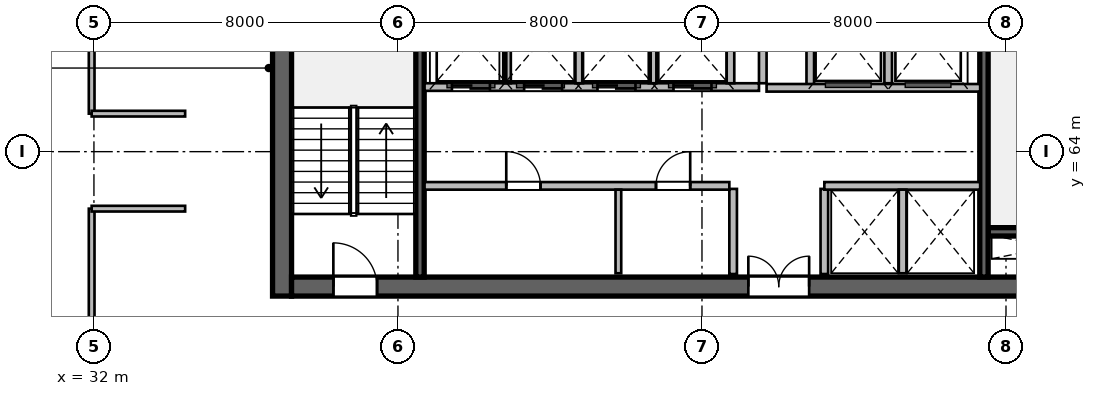
"""IFC4 building model, lengths in metres.
Left out: names, types, materials, properties, quantities, classifications, styles, units other than length and angle.
Written with IfcOpenShell. Run it as: python <this file> out.ifc"""

import sys

from ifc_helpers import new_model, si_unit, direction, frame, frame_2d, origin, place, context, subcontext, project, spatial, rectangle, extrude, source, transform, mapped, element, fill, save


model = new_model("IFC4")
c1 = context("Model", 3, precision=1e-05, world=origin(), true_north=direction((0.0, 1.0)))
c2 = subcontext(c1, "Body", "Model", "MODEL_VIEW")
j1 = project(units=[si_unit("LENGTHUNIT", "METRE"), si_unit("PLANEANGLEUNIT", "RADIAN")], contexts=[c1])
p1 = place(None, origin())
s1 = spatial("IfcSite", under=j1, at=p1, CompositionType="ELEMENT")
p2 = place(p1, origin())
s2 = spatial("IfcBuilding", under=s1, at=p2, CompositionType="ELEMENT")
p3 = place(p2, frame((0.0, 0.0, 142.8)))
s3 = spatial("IfcBuildingStorey", under=s2, at=p3, CompositionType="ELEMENT", Elevation=142.8)
m1 = source(origin(), c2, "Body", "SweptSolid", [
    extrude(rectangle(XDim=12.0, YDim=0.5, at=frame_2d((6.0, 0.0))), origin(), (0.0, 0.0, 1.0), 3.9),
])
p4 = place(p3, frame((36.95, 60.2, 0.0), z_axis=(0.0, 0.0, 1.0), x_axis=(0.0, 1.0, 0.0)))
e1 = element("IfcWall", 1, at=p4, inside=s3, PredefinedType="SHEAR", context=c2, shape_type="MappedRepresentation", body=[
    mapped(m1, transform((0.0, 0.0, 0.0), scale=1.0)),
])
m2 = source(origin(), c2, "Body", "SweptSolid", [
    extrude(rectangle(XDim=21.6, YDim=0.5, at=frame_2d((10.8, 0.0))), origin(), (0.0, 0.0, 1.0), 3.9),
])
p5 = place(p3, frame((37.2, 60.45, 0.0), z_axis=(0.0, 0.0, 1.0), x_axis=(1.0, 0.0, 0.0)))
e2 = element("IfcWall", 2, at=p5, inside=s3, PredefinedType="SHEAR", context=c2, shape_type="MappedRepresentation", body=[
    mapped(m2, transform((0.0, 0.0, 0.0), scale=1.0)),
])
p6 = place(p5, frame((1.1, 0.0, 0.0)))
e3 = element("IfcOpeningElement", 3, at=p6, cuts=e2, PredefinedType="OPENING", context=c2, shape_type="SweptSolid", body=[
    extrude(rectangle(XDim=1.15, YDim=2.15, at=frame_2d((0.575, 1.075))), frame((0.0, 0.26, 0.0), z_axis=(0.0, -1.0, 0.0), x_axis=(1.0, 0.0, 0.0)), (0.0, 0.0, 1.0), 0.52),
])
p7 = place(p5, frame((19.5, 0.0, 0.0)))
e4 = element("IfcOpeningElement", 4, at=p7, cuts=e2, PredefinedType="OPENING", context=c2, shape_type="SweptSolid", body=[
    extrude(rectangle(XDim=0.9, YDim=2.1, at=frame_2d((0.45, 1.05))), frame((0.0, 0.26, 0.0), z_axis=(0.0, -1.0, 0.0), x_axis=(1.0, 0.0, 0.0)), (0.0, 0.0, 1.0), 0.52),
])
p8 = place(p5, frame((12.02, 0.0, 0.0)))
e5 = element("IfcOpeningElement", 5, at=p8, cuts=e2, PredefinedType="OPENING", context=c2, shape_type="SweptSolid", body=[
    extrude(rectangle(XDim=1.6, YDim=2.15, at=frame_2d((0.8, 1.075))), frame((0.0, 0.26, 0.0), z_axis=(0.0, -1.0, 0.0), x_axis=(1.0, 0.0, 0.0)), (0.0, 0.0, 1.0), 0.52),
])
m3 = source(origin(), c2, "Body", "SweptSolid", [
    extrude(rectangle(XDim=3.27, YDim=0.22, at=frame_2d((1.635, 0.0))), origin(), (0.0, 0.0, 1.0), 3.9),
])
p9 = place(p3, frame((55.53, 61.89, 0.0), z_axis=(0.0, 0.0, 1.0), x_axis=(1.0, 0.0, 0.0)))
e6 = element("IfcWall", 6, at=p9, inside=s3, PredefinedType="SHEAR", context=c2, shape_type="MappedRepresentation", body=[
    mapped(m3, transform((0.0, 0.0, 0.0), scale=1.0)),
])
m4 = source(origin(), c2, "Body", "SweptSolid", [
    extrude(rectangle(XDim=11.0, YDim=0.22, at=frame_2d((5.5, 0.0))), origin(), (0.0, 0.0, 1.0), 3.9),
])
p10 = place(p3, frame((40.58, 60.7, 0.0), z_axis=(0.0, 0.0, 1.0), x_axis=(0.0, 1.0, 0.0)))
e7 = element("IfcWall", 7, at=p10, inside=s3, PredefinedType="SHEAR", context=c2, shape_type="MappedRepresentation", body=[
    mapped(m4, transform((0.0, 0.0, 0.0), scale=1.0)),
])
p11 = place(p3, frame((55.42, 60.7, 0.0), z_axis=(0.0, 0.0, 1.0), x_axis=(0.0, 1.0, 0.0)))
e8 = element("IfcWall", 8, at=p11, inside=s3, PredefinedType="SHEAR", context=c2, shape_type="MappedRepresentation", body=[
    mapped(m4, transform((0.0, 0.0, 0.0), scale=1.0)),
])
p12 = place(p11, frame((9.545, 0.0, 0.0)))
e9 = element("IfcOpeningElement", 9, at=p12, cuts=e8, PredefinedType="OPENING", context=c2, shape_type="SweptSolid", body=[
    extrude(rectangle(XDim=1.15, YDim=2.15, at=frame_2d((0.575, 1.075))), frame((0.0, 0.12, 0.0), z_axis=(0.0, -1.0, 0.0), x_axis=(1.0, 0.0, 0.0)), (0.0, 0.0, 1.0), 0.24),
])
m5 = source(origin(), c2, "Body", "SweptSolid", [
    extrude(rectangle(XDim=2.24, YDim=0.2, at=frame_2d((1.12, 0.0))), origin(), (0.0, 0.0, 1.0), 3.65),
])
for number, where, z_axis, x_axis in (
    (10, (48.82, 60.78, 0.0), (0.0, 0.0, 1.0), (0.0, 1.0, 0.0)),
    (11, (51.22, 60.78, 0.0), (0.0, 0.0, 1.0), (0.0, 1.0, 0.0)),
):
    element("IfcWall", number, at=place(p3, frame(where, z_axis=z_axis, x_axis=x_axis)), inside=s3, PredefinedType="SOLIDWALL", context=c2, shape_type="MappedRepresentation", body=[
        mapped(m5, transform((0.0, 0.0, 0.0), scale=1.0)),
    ])
m6 = source(origin(), c2, "Body", "SweptSolid", [
    extrude(rectangle(XDim=5.8, YDim=0.2, at=frame_2d((2.9, 0.0))), origin(), (0.0, 0.0, 1.0), 3.65),
])
p13 = place(p3, frame((49.6, 65.8, 0.0), z_axis=(0.0, 0.0, 1.0), x_axis=(0.0, 1.0, 0.0)))
e12 = element("IfcWall", 12, at=p13, inside=s3, PredefinedType="SOLIDWALL", context=c2, shape_type="MappedRepresentation", body=[
    mapped(m6, transform((0.0, 0.0, 0.0), scale=1.0)),
])
m7 = source(origin(), c2, "Body", "SweptSolid", [
    extrude(rectangle(XDim=2.58, YDim=0.2, at=frame_2d((1.29, 0.0))), origin(), (0.0, 0.0, 1.0), 3.65),
])
p14 = place(p3, frame((50.85, 65.68, 0.0), z_axis=(0.0, 0.0, 1.0), x_axis=(0.0, 1.0, 0.0)))
e13 = element("IfcWall", 13, at=p14, inside=s3, PredefinedType="SOLIDWALL", context=c2, shape_type="MappedRepresentation", body=[
    mapped(m7, transform((0.0, 0.0, 0.0), scale=1.0)),
])
m8 = source(origin(), c2, "Body", "SweptSolid", [
    extrude(rectangle(XDim=2.4, YDim=0.2, at=frame_2d((1.2, 0.0))), origin(), (0.0, 0.0, 1.0), 3.65),
])
p15 = place(p3, frame((52.9, 65.8, 0.0), z_axis=(0.0, 0.0, 1.0), x_axis=(0.0, 1.0, 0.0)))
e14 = element("IfcWall", 14, at=p15, inside=s3, PredefinedType="SOLIDWALL", context=c2, shape_type="MappedRepresentation", body=[
    mapped(m8, transform((0.0, 0.0, 0.0), scale=1.0)),
])
m9 = source(origin(), c2, "Body", "SweptSolid", [
    extrude(rectangle(XDim=5.62, YDim=0.2, at=frame_2d((2.81, 0.0))), origin(), (0.0, 0.0, 1.0), 3.65),
])
p16 = place(p3, frame((49.7, 65.68, 0.0), z_axis=(0.0, 0.0, 1.0), x_axis=(1.0, 0.0, 0.0)))
e15 = element("IfcWall", 15, at=p16, inside=s3, PredefinedType="SOLIDWALL", context=c2, shape_type="MappedRepresentation", body=[
    mapped(m9, transform((0.0, 0.0, 0.0), scale=1.0)),
])
m10 = source(origin(), c2, "Body", "SweptSolid", [
    extrude(rectangle(XDim=8.02, YDim=0.2, at=frame_2d((4.01, 0.0))), origin(), (0.0, 0.0, 1.0), 3.65),
])
p17 = place(p3, frame((40.7, 63.1, 0.0), z_axis=(0.0, 0.0, 1.0), x_axis=(1.0, 0.0, 0.0)))
e16 = element("IfcWall", 16, at=p17, inside=s3, PredefinedType="SOLIDWALL", context=c2, shape_type="MappedRepresentation", body=[
    mapped(m10, transform((0.0, 0.0, 0.0), scale=1.0)),
])
p18 = place(p17, frame((2.15, 0.0, 0.0)))
e17 = element("IfcOpeningElement", 17, at=p18, cuts=e16, PredefinedType="OPENING", context=c2, shape_type="SweptSolid", body=[
    extrude(rectangle(XDim=0.9, YDim=2.1, at=frame_2d((0.45, 1.05))), frame((0.0, 0.11, 0.0), z_axis=(0.0, -1.0, 0.0), x_axis=(1.0, 0.0, 0.0)), (0.0, 0.0, 1.0), 0.22),
])
p19 = place(p17, frame((6.09, 0.0, 0.0)))
e18 = element("IfcOpeningElement", 18, at=p19, cuts=e16, PredefinedType="OPENING", context=c2, shape_type="SweptSolid", body=[
    extrude(rectangle(XDim=0.9, YDim=2.1, at=frame_2d((0.45, 1.05))), frame((0.0, 0.11, 0.0), z_axis=(0.0, -1.0, 0.0), x_axis=(1.0, 0.0, 0.0)), (0.0, 0.0, 1.0), 0.22),
])
m11 = source(origin(), c2, "Body", "SweptSolid", [
    extrude(rectangle(XDim=4.1, YDim=0.2, at=frame_2d((2.05, 0.0))), origin(), (0.0, 0.0, 1.0), 3.65),
])
p20 = place(p3, frame((51.22, 63.1, 0.0), z_axis=(0.0, 0.0, 1.0), x_axis=(1.0, 0.0, 0.0)))
e19 = element("IfcWall", 19, at=p20, inside=s3, PredefinedType="SOLIDWALL", context=c2, shape_type="MappedRepresentation", body=[
    mapped(m11, transform((0.0, 0.0, 0.0), scale=1.0)),
])
m12 = source(origin(), c2, "Body", "SweptSolid", [
    extrude(rectangle(XDim=2.2, YDim=0.15, at=frame_2d((1.1, 0.0))), origin(), (0.0, 0.0, 1.0), 3.65),
])
p21 = place(p3, frame((45.8, 60.8, 0.0), z_axis=(0.0, 0.0, 1.0), x_axis=(0.0, 1.0, 0.0)))
e20 = element("IfcWall", 20, at=p21, inside=s3, PredefinedType="PARTITIONING", context=c2, shape_type="MappedRepresentation", body=[
    mapped(m12, transform((0.0, 0.0, 0.0), scale=1.0)),
])
m13 = source(origin(), c2, "Body", "SweptSolid", [
    extrude(rectangle(XDim=2.2, YDim=0.2, at=frame_2d((1.1, 0.0))), origin(), (0.0, 0.0, 1.0), 3.65),
])
p22 = place(p3, frame((53.28, 60.8, 0.0), z_axis=(0.0, 0.0, 1.0), x_axis=(0.0, 1.0, 0.0)))
e21 = element("IfcWall", 21, at=p22, inside=s3, PredefinedType="SOLIDWALL", context=c2, shape_type="MappedRepresentation", body=[
    mapped(m13, transform((0.0, 0.0, 0.0), scale=1.0)),
])
m14 = source(origin(), c2, "Body", "SweptSolid", [
    extrude(rectangle(XDim=8.8, YDim=0.2, at=frame_2d((4.4, 0.0))), origin(), (0.0, 0.0, 1.0), 3.65),
])
p23 = place(p3, frame((40.7, 65.7, 0.0), z_axis=(0.0, 0.0, 1.0), x_axis=(1.0, 0.0, 0.0)))
e22 = element("IfcWall", 22, at=p23, inside=s3, PredefinedType="SOLIDWALL", context=c2, shape_type="MappedRepresentation", body=[
    mapped(m14, transform((0.0, 0.0, 0.0), scale=1.0)),
])
p24 = place(p23, frame((0.72, 0.0, 0.0)))
e23 = element("IfcOpeningElement", 23, at=p24, cuts=e22, PredefinedType="OPENING", context=c2, shape_type="SweptSolid", body=[
    extrude(rectangle(XDim=1.0, YDim=2.15, at=frame_2d((0.5, 1.075))), frame((0.0, 0.11, 0.0), z_axis=(0.0, -1.0, 0.0), x_axis=(1.0, 0.0, 0.0)), (0.0, 0.0, 1.0), 0.22),
])
p25 = place(p23, frame((2.62, 0.0, 0.0)))
e24 = element("IfcOpeningElement", 24, at=p25, cuts=e22, PredefinedType="OPENING", context=c2, shape_type="SweptSolid", body=[
    extrude(rectangle(XDim=1.0, YDim=2.15, at=frame_2d((0.5, 1.075))), frame((0.0, 0.11, 0.0), z_axis=(0.0, -1.0, 0.0), x_axis=(1.0, 0.0, 0.0)), (0.0, 0.0, 1.0), 0.22),
])
p26 = place(p23, frame((4.55, 0.0, 0.0)))
e25 = element("IfcOpeningElement", 25, at=p26, cuts=e22, PredefinedType="OPENING", context=c2, shape_type="SweptSolid", body=[
    extrude(rectangle(XDim=1.0, YDim=2.15, at=frame_2d((0.5, 1.075))), frame((0.0, 0.11, 0.0), z_axis=(0.0, -1.0, 0.0), x_axis=(1.0, 0.0, 0.0)), (0.0, 0.0, 1.0), 0.22),
])
p27 = place(p23, frame((6.55, 0.0, 0.0)))
e26 = element("IfcOpeningElement", 26, at=p27, cuts=e22, PredefinedType="OPENING", context=c2, shape_type="SweptSolid", body=[
    extrude(rectangle(XDim=1.0, YDim=2.15, at=frame_2d((0.5, 1.075))), frame((0.0, 0.11, 0.0), z_axis=(0.0, -1.0, 0.0), x_axis=(1.0, 0.0, 0.0)), (0.0, 0.0, 1.0), 0.22),
])
for number, where, z_axis, x_axis in (
    (27, (48.75, 65.8, 0.0), (0.0, 0.0, 1.0), (0.0, 1.0, 0.0)),
    (28, (42.87, 65.8, 0.0), (0.0, 0.0, 1.0), (0.0, 1.0, 0.0)),
    (29, (44.77, 65.8, 0.0), (0.0, 0.0, 1.0), (0.0, 1.0, 0.0)),
    (30, (46.7, 65.8, 0.0), (0.0, 0.0, 1.0), (0.0, 1.0, 0.0)),
):
    element("IfcWall", number, at=place(p3, frame(where, z_axis=z_axis, x_axis=x_axis)), inside=s3, PredefinedType="SOLIDWALL", context=c2, shape_type="MappedRepresentation", body=[
        mapped(m8, transform((0.0, 0.0, 0.0), scale=1.0)),
    ])
m15 = source(origin(), c2, "Body", "SweptSolid", [
    extrude(rectangle(XDim=15.598, YDim=0.15, at=frame_2d((7.799, 0.0))), origin(), (0.0, 0.0, 1.0), 2.942),
])
p28 = place(p3, frame((31.94, 46.902, 0.0), z_axis=(0.0, 0.0, 1.0), x_axis=(0.0, 1.0, 0.0)))
e31 = element("IfcWall", 31, at=p28, inside=s3, PredefinedType="PARTITIONING", context=c2, shape_type="MappedRepresentation", body=[
    mapped(m15, transform((0.0, 0.0, 0.0), scale=1.0)),
])
p29 = place(p28, frame((7.324, 0.0, 0.0)))
e32 = element("IfcOpeningElement", 32, at=p29, cuts=e31, PredefinedType="OPENING", context=c2, shape_type="SweptSolid", body=[
    extrude(rectangle(XDim=0.95, YDim=2.1, at=frame_2d((0.475, 1.05))), frame((0.0, 0.085, 0.0), z_axis=(0.0, -1.0, 0.0), x_axis=(1.0, 0.0, 0.0)), (0.0, 0.0, 1.0), 0.17),
])
m16 = source(origin(), c2, "Body", "SweptSolid", [
    extrude(rectangle(XDim=2.46, YDim=0.15, at=frame_2d((1.23, 0.0))), origin(), (0.0, 0.0, 1.0), 3.65),
])
p30 = place(p3, frame((31.94, 62.5, 0.0), z_axis=(0.0, 0.0, 1.0), x_axis=(1.0, 0.0, 0.0)))
e33 = element("IfcWall", 33, at=p30, inside=s3, PredefinedType="PARTITIONING", context=c2, shape_type="MappedRepresentation", body=[
    mapped(m16, transform((0.0, 0.0, 0.0), scale=1.0)),
])
m17 = source(origin(), c2, "Body", "SweptSolid", [
    extrude(rectangle(XDim=8.187, YDim=0.15, at=frame_2d((4.093, 0.0))), origin(), (0.0, 0.0, 1.0), 3.65),
])
p31 = place(p3, frame((31.94, 65.0, 0.0), z_axis=(0.0, 0.0, 1.0), x_axis=(0.0, 1.0, 0.0)))
e34 = element("IfcWall", 34, at=p31, inside=s3, PredefinedType="PARTITIONING", context=c2, shape_type="MappedRepresentation", body=[
    mapped(m17, transform((0.0, 0.0, 0.0), scale=1.0)),
])
p32 = place(p31, frame((3.618, 0.0, 0.0)))
e35 = element("IfcOpeningElement", 35, at=p32, cuts=e34, PredefinedType="OPENING", context=c2, shape_type="SweptSolid", body=[
    extrude(rectangle(XDim=0.95, YDim=2.1, at=frame_2d((0.475, 1.05))), frame((0.0, 0.085, 0.0), z_axis=(0.0, -1.0, 0.0), x_axis=(1.0, 0.0, 0.0)), (0.0, 0.0, 1.0), 0.17),
])
p33 = place(p3, frame((31.94, 65.0, 0.0), z_axis=(0.0, 0.0, 1.0), x_axis=(1.0, 0.0, 0.0)))
e36 = element("IfcWall", 36, at=p33, inside=s3, PredefinedType="PARTITIONING", context=c2, shape_type="MappedRepresentation", body=[
    mapped(m16, transform((0.0, 0.0, 0.0), scale=1.0)),
])
m18 = source(origin(), c2, "Body", "SweptSolid", [
    extrude(rectangle(XDim=1.15, YDim=2.15, at=frame_2d((0.575, 1.075))), frame((0.0, 0.025, 0.0), z_axis=(0.0, -1.0, 0.0), x_axis=(1.0, 0.0, 0.0)), (0.0, 0.0, 1.0), 0.05),
])
p34 = place(p6, origin())
e37 = element("IfcDoor", 37, at=p34, inside=s3, OperationType="SINGLE_SWING_LEFT", PredefinedType="DOOR", context=c2, shape_type="MappedRepresentation", body=[
    mapped(m18, transform((0.0, 0.0, 0.0), scale=1.0)),
])
fill(e3, e37)
m19 = source(origin(), c2, "Body", "SweptSolid", [
    extrude(rectangle(XDim=1.6, YDim=2.15, at=frame_2d((0.8, 1.075))), frame((0.0, 0.025, 0.0), z_axis=(0.0, -1.0, 0.0), x_axis=(1.0, 0.0, 0.0)), (0.0, 0.0, 1.0), 0.05),
])
p35 = place(p8, origin())
e38 = element("IfcDoor", 38, at=p35, inside=s3, OperationType="DOUBLE_DOOR_SINGLE_SWING", PredefinedType="DOOR", context=c2, shape_type="MappedRepresentation", body=[
    mapped(m19, transform((0.0, 0.0, 0.0), scale=1.0)),
])
fill(e5, e38)
m20 = source(origin(), c2, "Body", "SweptSolid", [
    extrude(rectangle(XDim=0.9, YDim=2.1, at=frame_2d((0.45, 1.05))), frame((0.0, 0.025, 0.0), z_axis=(0.0, -1.0, 0.0), x_axis=(1.0, 0.0, 0.0)), (0.0, 0.0, 1.0), 0.05),
])
p36 = place(p18, origin())
e39 = element("IfcDoor", 39, at=p36, inside=s3, OperationType="SINGLE_SWING_LEFT", PredefinedType="DOOR", context=c2, shape_type="MappedRepresentation", body=[
    mapped(m20, transform((0.0, 0.0, 0.0), scale=1.0)),
])
fill(e17, e39)
p37 = place(p19, origin())
e40 = element("IfcDoor", 40, at=p37, inside=s3, OperationType="SINGLE_SWING_RIGHT", PredefinedType="DOOR", context=c2, shape_type="MappedRepresentation", body=[
    mapped(m20, transform((0.0, 0.0, 0.0), scale=1.0)),
])
fill(e18, e40)
m21 = source(origin(), c2, "Body", "SweptSolid", [
    extrude(rectangle(XDim=1.0, YDim=2.15, at=frame_2d((0.5, 1.075))), frame((0.0, 0.025, 0.0), z_axis=(0.0, -1.0, 0.0), x_axis=(1.0, 0.0, 0.0)), (0.0, 0.0, 1.0), 0.05),
])
p38 = place(p24, origin())
e41 = element("IfcDoor", 41, at=p38, inside=s3, OperationType="DOUBLE_DOOR_SLIDING", PredefinedType="DOOR", context=c2, shape_type="MappedRepresentation", body=[
    mapped(m21, transform((0.0, 0.0, 0.0), scale=1.0)),
])
fill(e23, e41)
p39 = place(p25, origin())
e42 = element("IfcDoor", 42, at=p39, inside=s3, OperationType="DOUBLE_DOOR_SLIDING", PredefinedType="DOOR", context=c2, shape_type="MappedRepresentation", body=[
    mapped(m21, transform((0.0, 0.0, 0.0), scale=1.0)),
])
fill(e24, e42)
p40 = place(p26, origin())
e43 = element("IfcDoor", 43, at=p40, inside=s3, OperationType="DOUBLE_DOOR_SLIDING", PredefinedType="DOOR", context=c2, shape_type="MappedRepresentation", body=[
    mapped(m21, transform((0.0, 0.0, 0.0), scale=1.0)),
])
fill(e25, e43)
p41 = place(p27, origin())
e44 = element("IfcDoor", 44, at=p41, inside=s3, OperationType="DOUBLE_DOOR_SLIDING", PredefinedType="DOOR", context=c2, shape_type="MappedRepresentation", body=[
    mapped(m21, transform((0.0, 0.0, 0.0), scale=1.0)),
])
fill(e26, e44)
save(model, sys.argv[1])
